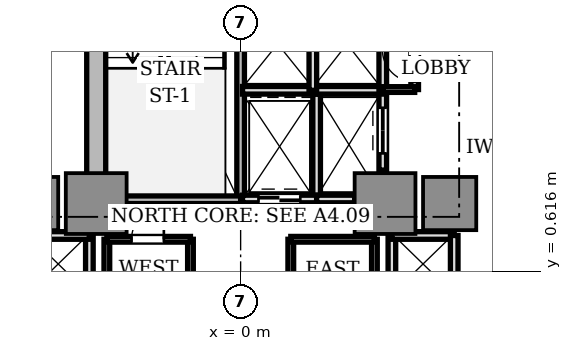
"""IFC4 building model, lengths in metres.
Left out: names, types, materials, properties, quantities, classifications, styles, units other than length and angle.
Written with IfcOpenShell. Run it as: python <this file> out.ifc"""

import sys

from ifc_helpers import new_model, si_unit, direction, frame, frame_2d, origin, origin_2d, place, context, subcontext, project, spatial, rectangle, extrude, source, transform, mapped, element, fill, save


model = new_model("IFC4")
c1 = context("Model", 3, precision=1e-05, world=origin(), true_north=direction((0.0, 1.0)))
c2 = subcontext(c1, "Body", "Model", "MODEL_VIEW")
j1 = project(units=[si_unit("LENGTHUNIT", "METRE"), si_unit("PLANEANGLEUNIT", "RADIAN")], contexts=[c1])
p1 = place(None, origin())
s1 = spatial("IfcSite", under=j1, at=p1, CompositionType="ELEMENT")
p2 = place(p1, origin())
s2 = spatial("IfcBuilding", under=s1, at=p2, CompositionType="ELEMENT")
p3 = place(p2, frame((0.0, 0.0, 57.75)))
s3 = spatial("IfcBuildingStorey", under=s2, at=p3, CompositionType="ELEMENT", Elevation=57.75)
p4 = place(p3, frame((-3.8, 2.85, 0.0), z_axis=(0.0, 0.0, 1.0), x_axis=(0.0, 1.0, 0.0)))
e1 = element("IfcWall", 1, at=p4, inside=s3, PredefinedType="SHEAR", context=c2, shape_type="SweptSolid", body=[
    extrude(rectangle(XDim=6.9, YDim=0.5, at=frame_2d((3.45, 0.0))), origin(), (0.0, 0.0, 1.0), 3.11),
])
m1 = source(origin(), c2, "Body", "SweptSolid", [
    extrude(rectangle(XDim=1.6, YDim=1.6, at=origin_2d()), origin(), (0.0, 0.0, 1.0), 3.11),
])
for number, where, z_axis, x_axis in (
    (2, (-3.8, 2.4, 0.0), (0.0, 0.0, 1.0), (1.0, 0.0, 0.0)),
    (3, (3.8, 2.4, 0.0), (0.0, 0.0, 1.0), (1.0, 0.0, 0.0)),
):
    element("IfcColumn", number, at=place(p3, frame(where, z_axis=z_axis, x_axis=x_axis)), inside=s3, PredefinedType="COLUMN", context=c2, shape_type="MappedRepresentation", body=[
        mapped(m1, transform((0.0, 0.0, 0.0), scale=1.0)),
    ])
m2 = source(origin(), c2, "Body", "SweptSolid", [
    extrude(rectangle(XDim=1.4, YDim=1.4, at=origin_2d()), origin(), (0.0, 0.0, 1.0), 3.11),
])
for number, where, z_axis, x_axis in (
    (4, (5.5, 2.4, 0.0), (0.0, 0.0, 1.0), (1.0, 0.0, 0.0)),
    (5, (-5.5, 2.4, 0.0), (0.0, 0.0, 1.0), (1.0, 0.0, 0.0)),
):
    element("IfcColumn", number, at=place(p3, frame(where, z_axis=z_axis, x_axis=x_axis)), inside=s3, PredefinedType="COLUMN", context=c2, shape_type="MappedRepresentation", body=[
        mapped(m2, transform((0.0, 0.0, 0.0), scale=1.0)),
    ])
p5 = place(p3, frame((0.0, 2.5, 0.0), z_axis=(0.0, 0.0, 1.0), x_axis=(0.0, 1.0, 0.0)))
e6 = element("IfcWall", 6, at=p5, inside=s3, PredefinedType="SOLIDWALL", context=c2, shape_type="SweptSolid", body=[
    extrude(rectangle(XDim=7.68, YDim=0.2, at=frame_2d((3.84, 0.0))), origin(), (0.0, 0.0, 1.0), 3.11),
])
p6 = place(p5, frame((6.5, 0.0, 0.0)))
e7 = element("IfcOpeningElement", 7, at=p6, cuts=e6, PredefinedType="OPENING", context=c2, shape_type="SweptSolid", body=[
    extrude(rectangle(XDim=0.95, YDim=2.15, at=frame_2d((0.475, 1.075))), frame((0.0, 0.11, 0.0), z_axis=(0.0, -1.0, 0.0), x_axis=(1.0, 0.0, 0.0)), (0.0, 0.0, 1.0), 0.22),
])
p7 = place(p3, frame((-3.72, 2.5, 0.0), z_axis=(0.0, 0.0, 1.0), x_axis=(1.0, 0.0, 0.0)))
e8 = element("IfcWall", 8, at=p7, inside=s3, PredefinedType="SOLIDWALL", context=c2, shape_type="SweptSolid", body=[
    extrude(rectangle(XDim=3.72, YDim=0.2, at=frame_2d((1.86, 0.0))), origin(), (0.0, 0.0, 1.0), 3.11),
])
p8 = place(p3, frame((2.0, 2.5, 0.0), z_axis=(0.0, 0.0, 1.0), x_axis=(0.0, 1.0, 0.0)))
e9 = element("IfcWall", 9, at=p8, inside=s3, PredefinedType="SOLIDWALL", context=c2, shape_type="SweptSolid", body=[
    extrude(rectangle(XDim=2.78, YDim=0.2, at=frame_2d((1.39, 0.0))), origin(), (0.0, 0.0, 1.0), 2.66),
])
p9 = place(p3, frame((0.05, 2.52, 0.0), z_axis=(0.0, 0.0, 1.0), x_axis=(1.0, 0.0, 0.0)))
e10 = element("IfcWall", 10, at=p9, inside=s3, PredefinedType="SOLIDWALL", context=c2, shape_type="SweptSolid", body=[
    extrude(rectangle(XDim=1.95, YDim=0.2, at=frame_2d((0.975, 0.0))), origin(), (0.0, 0.0, 1.0), 2.66),
])
p10 = place(p9, frame((0.42, 0.0, 0.0)))
e11 = element("IfcOpeningElement", 11, at=p10, cuts=e10, PredefinedType="OPENING", context=c2, shape_type="SweptSolid", body=[
    extrude(rectangle(XDim=1.1, YDim=2.2, at=frame_2d((0.55, 1.1))), frame((0.0, 0.11, 0.0), z_axis=(0.0, -1.0, 0.0), x_axis=(1.0, 0.0, 0.0)), (0.0, 0.0, 1.0), 0.22),
])
p11 = place(p3, frame((2.0, 2.52, 0.0), z_axis=(0.0, 0.0, 1.0), x_axis=(1.0, 0.0, 0.0)))
e12 = element("IfcWall", 12, at=p11, inside=s3, PredefinedType="SOLIDWALL", context=c2, shape_type="SweptSolid", body=[
    extrude(rectangle(XDim=1.0, YDim=0.2, at=frame_2d((0.5, 0.0))), origin(), (0.0, 0.0, 1.0), 2.66),
])
p12 = place(p3, frame((3.74, 3.28, 0.0), z_axis=(0.0, 0.0, 1.0), x_axis=(0.0, 1.0, 0.0)))
e13 = element("IfcWall", 13, at=p12, inside=s3, PredefinedType="SOLIDWALL", context=c2, shape_type="SweptSolid", body=[
    extrude(rectangle(XDim=2.08, YDim=0.2, at=frame_2d((1.04, 0.0))), origin(), (0.0, 0.0, 1.0), 2.66),
])
p13 = place(p12, frame((0.44, 0.0, 0.0)))
e14 = element("IfcOpeningElement", 14, at=p13, cuts=e13, PredefinedType="OPENING", context=c2, shape_type="SweptSolid", body=[
    extrude(rectangle(XDim=1.2, YDim=2.2, at=frame_2d((0.6, 1.1))), frame((0.0, 0.11, 0.0), z_axis=(0.0, -1.0, 0.0), x_axis=(1.0, 0.0, 0.0)), (0.0, 0.0, 1.0), 0.22),
])
p14 = place(p3, frame((0.05, 5.38, 0.0), z_axis=(0.0, 0.0, 1.0), x_axis=(1.0, 0.0, 0.0)))
e15 = element("IfcWall", 15, at=p14, inside=s3, PredefinedType="SOLIDWALL", context=c2, shape_type="SweptSolid", body=[
    extrude(rectangle(XDim=3.69, YDim=0.2, at=frame_2d((1.845, 0.0))), origin(), (0.0, 0.0, 1.0), 2.66),
])
for number, where, z_axis, x_axis in (
    (16, (1.9, 5.38, 0.0), (0.0, 0.0, 1.0), (0.0, 1.0, 0.0)),
    (17, (3.74, 5.38, 0.0), (0.0, 0.0, 1.0), (0.0, 1.0, 0.0)),
):
    element("IfcWall", number, at=place(p3, frame(where, z_axis=z_axis, x_axis=x_axis)), inside=s3, PredefinedType="SOLIDWALL", context=c2, shape_type="SweptSolid", body=[
        extrude(rectangle(XDim=2.48, YDim=0.2, at=frame_2d((1.24, 0.0))), origin(), (0.0, 0.0, 1.0), 2.66),
    ])
p15 = place(p3, frame((3.98, -1.56, 0.0), z_axis=(0.0, 0.0, 1.0), x_axis=(0.0, 1.0, 0.0)))
e18 = element("IfcWall", 18, at=p15, inside=s3, PredefinedType="SOLIDWALL", context=c2, shape_type="SweptSolid", body=[
    extrude(rectangle(XDim=3.12, YDim=0.2, at=frame_2d((1.56, 0.0))), origin(), (0.0, 0.0, 1.0), 2.18),
])
p16 = place(p3, frame((3.98, 1.56, 0.0), z_axis=(0.0, 0.0, 1.0), x_axis=(1.0, 0.0, 0.0)))
e19 = element("IfcWall", 19, at=p16, inside=s3, PredefinedType="SOLIDWALL", context=c2, shape_type="SweptSolid", body=[
    extrude(rectangle(XDim=1.64, YDim=0.2, at=frame_2d((0.82, 0.0))), origin(), (0.0, 0.0, 1.0), 2.66),
])
p17 = place(p3, frame((5.62, 0.0, 0.0), z_axis=(0.0, 0.0, 1.0), x_axis=(0.0, 1.0, 0.0)))
e20 = element("IfcWall", 20, at=p17, inside=s3, PredefinedType="SOLIDWALL", context=c2, shape_type="SweptSolid", body=[
    extrude(rectangle(XDim=1.56, YDim=0.2, at=frame_2d((0.78, 0.0))), origin(), (0.0, 0.0, 1.0), 2.66),
])
p18 = place(p3, frame((-3.98, -1.56, 0.0), z_axis=(0.0, 0.0, 1.0), x_axis=(0.0, 1.0, 0.0)))
e21 = element("IfcWall", 21, at=p18, inside=s3, PredefinedType="SOLIDWALL", context=c2, shape_type="SweptSolid", body=[
    extrude(rectangle(XDim=3.12, YDim=0.2, at=frame_2d((1.56, 0.0))), origin(), (0.0, 0.0, 1.0), 2.18),
])
p19 = place(p3, frame((-5.62, 1.56, 0.0), z_axis=(0.0, 0.0, 1.0), x_axis=(1.0, 0.0, 0.0)))
e22 = element("IfcWall", 22, at=p19, inside=s3, PredefinedType="SOLIDWALL", context=c2, shape_type="SweptSolid", body=[
    extrude(rectangle(XDim=1.64, YDim=0.2, at=frame_2d((0.82, 0.0))), origin(), (0.0, 0.0, 1.0), 2.66),
])
p20 = place(p3, frame((4.58, 5.4, 0.0), z_axis=(0.0, 0.0, 1.0), x_axis=(0.0, 1.0, 0.0)))
e23 = element("IfcWall", 23, at=p20, inside=s3, PredefinedType="SOLIDWALL", context=c2, shape_type="SweptSolid", body=[
    extrude(rectangle(XDim=2.46, YDim=0.2, at=frame_2d((1.23, 0.0))), origin(), (0.0, 0.0, 1.0), 2.66),
])
p21 = place(p20, frame((0.2, 0.0, 0.0)))
e24 = element("IfcOpeningElement", 24, at=p21, cuts=e23, PredefinedType="OPENING", context=c2, shape_type="SweptSolid", body=[
    extrude(rectangle(XDim=0.85, YDim=2.1, at=frame_2d((0.425, 1.05))), frame((0.0, 0.11, 0.0), z_axis=(0.0, -1.0, 0.0), x_axis=(1.0, 0.0, 0.0)), (0.0, 0.0, 1.0), 0.22),
])
p22 = place(p20, frame((1.38, 0.0, 0.0)))
e25 = element("IfcOpeningElement", 25, at=p22, cuts=e23, PredefinedType="OPENING", context=c2, shape_type="SweptSolid", body=[
    extrude(rectangle(XDim=0.85, YDim=2.1, at=frame_2d((0.425, 1.05))), frame((0.0, 0.11, 0.0), z_axis=(0.0, -1.0, 0.0), x_axis=(1.0, 0.0, 0.0)), (0.0, 0.0, 1.0), 0.22),
])
p23 = place(p3, frame((3.74, 5.4, 0.0), z_axis=(0.0, 0.0, 1.0), x_axis=(1.0, 0.0, 0.0)))
e26 = element("IfcWall", 26, at=p23, inside=s3, PredefinedType="PARTITIONING", context=c2, shape_type="SweptSolid", body=[
    extrude(rectangle(XDim=0.84, YDim=0.15, at=frame_2d((0.42, 0.0))), origin(), (0.0, 0.0, 1.0), 2.66),
])
p24 = place(p3, frame((-1.32, -1.46, 0.0), z_axis=(0.0, 0.0, 1.0), x_axis=(0.0, 1.0, 0.0)))
e27 = element("IfcWall", 27, at=p24, inside=s3, PredefinedType="PARTITIONING", context=c2, shape_type="SweptSolid", body=[
    extrude(rectangle(XDim=2.92, YDim=0.15, at=frame_2d((1.46, 0.0))), origin(), (0.0, 0.0, 1.0), 2.66),
])
p25 = place(p3, frame((-3.52, -1.46, 0.0), z_axis=(0.0, 0.0, 1.0), x_axis=(0.0, 1.0, 0.0)))
e28 = element("IfcWall", 28, at=p25, inside=s3, PredefinedType="PARTITIONING", context=c2, shape_type="SweptSolid", body=[
    extrude(rectangle(XDim=2.92, YDim=0.15, at=frame_2d((1.46, 0.0))), origin(), (0.0, 0.0, 1.0), 2.18),
])
p26 = place(p3, frame((-3.52, 1.46, 0.0), z_axis=(0.0, 0.0, 1.0), x_axis=(1.0, 0.0, 0.0)))
e29 = element("IfcWall", 29, at=p26, inside=s3, PredefinedType="PARTITIONING", context=c2, shape_type="SweptSolid", body=[
    extrude(rectangle(XDim=2.2, YDim=0.15, at=frame_2d((1.1, 0.0))), origin(), (0.0, 0.0, 1.0), 2.66),
])
p27 = place(p26, frame((0.65, 0.0, 0.0)))
e30 = element("IfcOpeningElement", 30, at=p27, cuts=e29, PredefinedType="OPENING", context=c2, shape_type="SweptSolid", body=[
    extrude(rectangle(XDim=0.85, YDim=2.1, at=frame_2d((0.425, 1.05))), frame((0.0, 0.085, 0.0), z_axis=(0.0, -1.0, 0.0), x_axis=(1.0, 0.0, 0.0)), (0.0, 0.0, 1.0), 0.17),
])
p28 = place(p3, frame((1.32, -1.46, 0.0), z_axis=(0.0, 0.0, 1.0), x_axis=(0.0, 1.0, 0.0)))
e31 = element("IfcWall", 31, at=p28, inside=s3, PredefinedType="PARTITIONING", context=c2, shape_type="SweptSolid", body=[
    extrude(rectangle(XDim=2.92, YDim=0.15, at=frame_2d((1.46, 0.0))), origin(), (0.0, 0.0, 1.0), 2.66),
])
p29 = place(p3, frame((3.52, -1.46, 0.0), z_axis=(0.0, 0.0, 1.0), x_axis=(0.0, 1.0, 0.0)))
e32 = element("IfcWall", 32, at=p29, inside=s3, PredefinedType="PARTITIONING", context=c2, shape_type="SweptSolid", body=[
    extrude(rectangle(XDim=2.92, YDim=0.15, at=frame_2d((1.46, 0.0))), origin(), (0.0, 0.0, 1.0), 2.18),
])
p30 = place(p3, frame((1.32, 1.46, 0.0), z_axis=(0.0, 0.0, 1.0), x_axis=(1.0, 0.0, 0.0)))
e33 = element("IfcWall", 33, at=p30, inside=s3, PredefinedType="PARTITIONING", context=c2, shape_type="SweptSolid", body=[
    extrude(rectangle(XDim=2.2, YDim=0.15, at=frame_2d((1.1, 0.0))), origin(), (0.0, 0.0, 1.0), 2.66),
])
m3 = source(origin(), c2, "Body", "SweptSolid", [
    extrude(rectangle(XDim=1.1, YDim=0.05, at=origin_2d()), origin(), (0.0, 0.0, 1.0), 2.2),
])
p31 = place(p10, frame((0.55, 0.0, 0.0)))
e34 = element("IfcDoor", 34, at=p31, inside=s3, OperationType="DOUBLE_DOOR_SLIDING", PredefinedType="DOOR", context=c2, shape_type="MappedRepresentation", body=[
    mapped(m3, transform((0.0, 0.0, 0.0), scale=1.0)),
])
fill(e11, e34)
m4 = source(origin(), c2, "Body", "SweptSolid", [
    extrude(rectangle(XDim=1.2, YDim=0.05, at=origin_2d()), origin(), (0.0, 0.0, 1.0), 2.2),
])
p32 = place(p13, frame((0.6, 0.0, 0.0)))
e35 = element("IfcDoor", 35, at=p32, inside=s3, OperationType="DOUBLE_DOOR_SLIDING", PredefinedType="DOOR", context=c2, shape_type="MappedRepresentation", body=[
    mapped(m4, transform((0.0, 0.0, 0.0), scale=1.0)),
])
fill(e14, e35)
m5 = source(origin(), c2, "Body", "SweptSolid", [
    extrude(rectangle(XDim=0.85, YDim=0.05, at=origin_2d()), origin(), (0.0, 0.0, 1.0), 2.1),
])
p33 = place(p21, frame((0.425, 0.0, 0.0)))
e36 = element("IfcDoor", 36, at=p33, inside=s3, OperationType="SINGLE_SWING_RIGHT", PredefinedType="DOOR", context=c2, shape_type="MappedRepresentation", body=[
    mapped(m5, transform((0.0, 0.0, 0.0), scale=1.0)),
])
fill(e24, e36)
p34 = place(p27, frame((0.425, 0.0, 0.0)))
e37 = element("IfcDoor", 37, at=p34, inside=s3, OperationType="SINGLE_SWING_RIGHT", PredefinedType="DOOR", context=c2, shape_type="MappedRepresentation", body=[
    mapped(m5, transform((0.0, 0.0, 0.0), scale=1.0)),
])
fill(e30, e37)
save(model, sys.argv[1])
